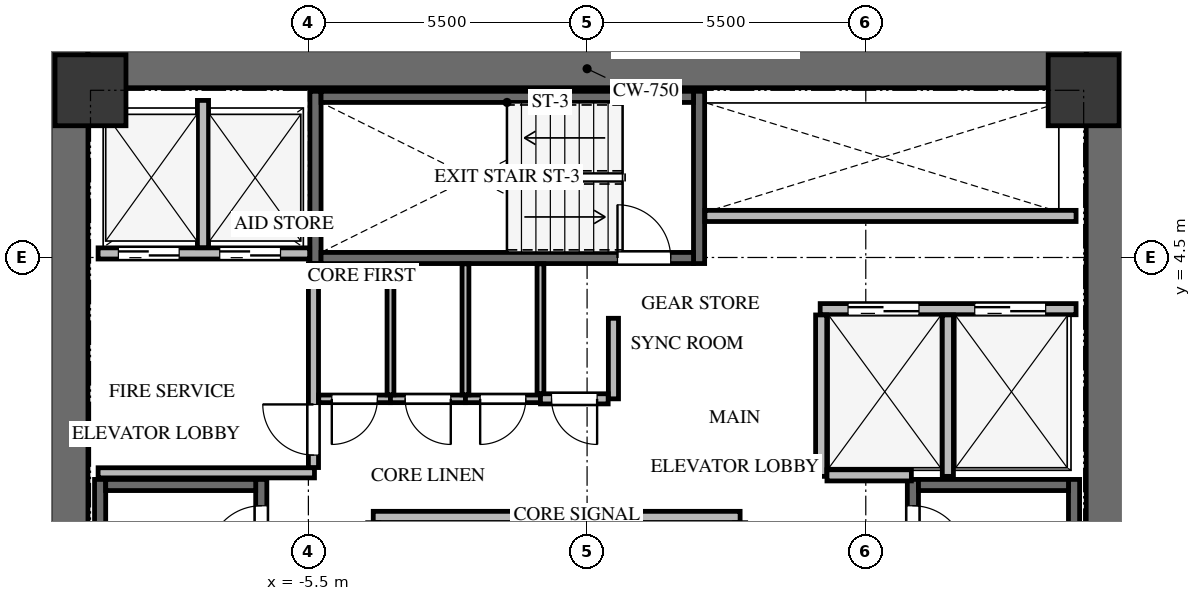
"""IFC4 building model, lengths in metres.
Left out: names, types, materials, properties, quantities, classifications, styles, units other than length and angle.
Written with IfcOpenShell. Run it as: python <this file> out.ifc"""

import sys

from ifc_helpers import new_model, si_unit, direction, frame, frame_2d, origin, origin_2d, place, context, subcontext, project, spatial, rectangle, extrude, source, transform, mapped, element, fill, save


model = new_model("IFC4")
c1 = context("Model", 3, precision=1e-05, world=origin(), true_north=direction((0.0, 1.0)))
c2 = subcontext(c1, "Body", "Model", "MODEL_VIEW")
j1 = project(units=[si_unit("LENGTHUNIT", "METRE"), si_unit("PLANEANGLEUNIT", "RADIAN")], contexts=[c1])
p1 = place(None, origin())
s1 = spatial("IfcSite", under=j1, at=p1, CompositionType="ELEMENT")
p2 = place(p1, origin())
s2 = spatial("IfcBuilding", under=s1, at=p2, CompositionType="ELEMENT")
p3 = place(p2, frame((0.0, 0.0, 137.1)))
s3 = spatial("IfcBuildingStorey", under=s2, at=p3, CompositionType="ELEMENT", Elevation=137.1)
for number, where, z_axis, x_axis in (
    (1, (-10.225, -8.6, 0.0), (0.0, 0.0, 1.0), (0.0, 1.0, 0.0)),
    (2, (10.225, -8.6, 0.0), (0.0, 0.0, 1.0), (0.0, 1.0, 0.0)),
):
    element("IfcWall", number, at=place(p3, frame(where, z_axis=z_axis, x_axis=x_axis)), inside=s3, PredefinedType="SHEAR", context=c2, shape_type="SweptSolid", body=[
        extrude(rectangle(XDim=17.2, YDim=0.75, at=frame_2d((8.6, 0.0))), origin(), (0.0, 0.0, 1.0), 3.0),
    ])
p4 = place(p3, frame((-9.85, 8.225, 0.0), z_axis=(0.0, 0.0, 1.0), x_axis=(1.0, 0.0, 0.0)))
e3 = element("IfcWall", 3, at=p4, inside=s3, PredefinedType="SHEAR", context=c2, shape_type="SweptSolid", body=[
    extrude(rectangle(XDim=19.7, YDim=0.75, at=frame_2d((9.85, 0.0))), origin(), (0.0, 0.0, 1.0), 3.0),
])
p5 = place(p3, frame((-6.43, -7.77, -0.24), z_axis=(0.0, 0.0, 1.0), x_axis=(0.0, 1.0, 0.0)))
e4 = element("IfcWall", 4, at=p5, inside=s3, PredefinedType="SHEAR", context=c2, shape_type="SweptSolid", body=[
    extrude(rectangle(XDim=7.89, YDim=0.22, at=frame_2d((3.945, 0.0))), origin(), (0.0, 0.0, 1.0), 3.0),
])
p6 = place(p5, frame((6.32, 0.0, 0.0)))
e5 = element("IfcOpeningElement", 5, at=p6, cuts=e4, PredefinedType="OPENING", context=c2, shape_type="SweptSolid", body=[
    extrude(rectangle(XDim=1.05, YDim=2.15, at=frame_2d((0.525, 1.075))), frame((0.0, 0.12, 0.0), z_axis=(0.0, -1.0, 0.0), x_axis=(1.0, 0.0, 0.0)), (0.0, 0.0, 1.0), 0.24),
])
p7 = place(p3, frame((-9.61, 0.12, -0.24), z_axis=(0.0, 0.0, 1.0), x_axis=(0.0, -1.0, 0.0)))
e6 = element("IfcWall", 6, at=p7, inside=s3, PredefinedType="SHEAR", context=c2, shape_type="SweptSolid", body=[
    extrude(rectangle(XDim=7.89, YDim=0.22, at=frame_2d((3.945, 0.0))), origin(), (0.0, 0.0, 1.0), 3.0),
])
p8 = place(p3, frame((-6.54, 0.01, -0.24), z_axis=(0.0, 0.0, 1.0), x_axis=(-1.0, 0.0, 0.0)))
e7 = element("IfcWall", 7, at=p8, inside=s3, PredefinedType="SHEAR", context=c2, shape_type="SweptSolid", body=[
    extrude(rectangle(XDim=2.96, YDim=0.22, at=frame_2d((1.48, 0.0))), origin(), (0.0, 0.0, 1.0), 3.0),
])
p9 = place(p3, frame((9.61, -7.77, -0.24), z_axis=(0.0, 0.0, 1.0), x_axis=(0.0, 1.0, 0.0)))
e8 = element("IfcWall", 8, at=p9, inside=s3, PredefinedType="SHEAR", context=c2, shape_type="SweptSolid", body=[
    extrude(rectangle(XDim=7.89, YDim=0.22, at=frame_2d((3.945, 0.0))), origin(), (0.0, 0.0, 1.0), 3.0),
])
p10 = place(p3, frame((6.43, 0.12, -0.24), z_axis=(0.0, 0.0, 1.0), x_axis=(0.0, -1.0, 0.0)))
e9 = element("IfcWall", 9, at=p10, inside=s3, PredefinedType="SHEAR", context=c2, shape_type="SweptSolid", body=[
    extrude(rectangle(XDim=7.89, YDim=0.22, at=frame_2d((3.945, 0.0))), origin(), (0.0, 0.0, 1.0), 3.0),
])
p11 = place(p10, frame((0.52, 0.0, 0.0)))
e10 = element("IfcOpeningElement", 10, at=p11, cuts=e9, PredefinedType="OPENING", context=c2, shape_type="SweptSolid", body=[
    extrude(rectangle(XDim=1.05, YDim=2.15, at=frame_2d((0.525, 1.075))), frame((0.0, 0.12, 0.0), z_axis=(0.0, -1.0, 0.0), x_axis=(1.0, 0.0, 0.0)), (0.0, 0.0, 1.0), 0.24),
])
p12 = place(p3, frame((9.5, 0.01, -0.24), z_axis=(0.0, 0.0, 1.0), x_axis=(-1.0, 0.0, 0.0)))
e11 = element("IfcWall", 11, at=p12, inside=s3, PredefinedType="SHEAR", context=c2, shape_type="SweptSolid", body=[
    extrude(rectangle(XDim=2.96, YDim=0.22, at=frame_2d((1.48, 0.0))), origin(), (0.0, 0.0, 1.0), 3.0),
])
for number, where, z_axis, x_axis in (
    (12, (2.21, 4.38, -0.24), (0.0, 0.0, 1.0), (0.0, 1.0, 0.0)),
    (13, (-5.36, 7.78, -0.24), (0.0, 0.0, 1.0), (0.0, -1.0, 0.0)),
):
    element("IfcWall", number, at=place(p3, frame(where, z_axis=z_axis, x_axis=x_axis)), inside=s3, PredefinedType="SHEAR", context=c2, shape_type="SweptSolid", body=[
        extrude(rectangle(XDim=3.4, YDim=0.22, at=frame_2d((1.7, 0.0))), origin(), (0.0, 0.0, 1.0), 3.0),
    ])
p13 = place(p3, frame((-5.25, 4.49, -0.24), z_axis=(0.0, 0.0, 1.0), x_axis=(1.0, 0.0, 0.0)))
e14 = element("IfcWall", 14, at=p13, inside=s3, PredefinedType="SHEAR", context=c2, shape_type="SweptSolid", body=[
    extrude(rectangle(XDim=7.35, YDim=0.22, at=frame_2d((3.675, 0.0))), origin(), (0.0, 0.0, 1.0), 3.0),
])
p14 = place(p13, frame((5.85, 0.0, 0.0)))
e15 = element("IfcOpeningElement", 15, at=p14, cuts=e14, PredefinedType="OPENING", context=c2, shape_type="SweptSolid", body=[
    extrude(rectangle(XDim=1.05, YDim=2.15, at=frame_2d((0.525, 1.075))), frame((0.0, 0.12, 0.0), z_axis=(0.0, -1.0, 0.0), x_axis=(1.0, 0.0, 0.0)), (0.0, 0.0, 1.0), 0.24),
])
p15 = place(p3, frame((2.1, 7.67, -0.24), z_axis=(0.0, 0.0, 1.0), x_axis=(-1.0, 0.0, 0.0)))
e16 = element("IfcWall", 16, at=p15, inside=s3, PredefinedType="SHEAR", context=c2, shape_type="SweptSolid", body=[
    extrude(rectangle(XDim=7.35, YDim=0.22, at=frame_2d((3.675, 0.0))), origin(), (0.0, 0.0, 1.0), 3.0),
])
m1 = source(origin(), c2, "Body", "SweptSolid", [
    extrude(rectangle(XDim=1.4, YDim=1.4, at=origin_2d()), origin(), (0.0, 0.0, 1.0), 3.0),
])
for number, where, z_axis, x_axis in (
    (17, (9.8, 7.8, -0.24), (0.0, 0.0, 1.0), (1.0, 0.0, 0.0)),
    (18, (-9.8, 7.8, -0.24), (0.0, 0.0, 1.0), (1.0, 0.0, 0.0)),
):
    element("IfcColumn", number, at=place(p3, frame(where, z_axis=z_axis, x_axis=x_axis)), inside=s3, PredefinedType="COLUMN", context=c2, shape_type="MappedRepresentation", body=[
        mapped(m1, transform((0.0, 0.0, 0.0), x_axis=(1.0, 0.0, 0.0), y_axis=(0.0, 1.0, 0.0), z_axis=(0.0, 0.0, 1.0), scale=1.0)),
    ])
p16 = place(p3, frame((-9.65, 4.58, 0.0), z_axis=(0.0, 0.0, 1.0), x_axis=(1.0, 0.0, 0.0)))
e19 = element("IfcWall", 19, at=p16, inside=s3, PredefinedType="SOLIDWALL", context=c2, shape_type="SweptSolid", body=[
    extrude(rectangle(XDim=4.175, YDim=0.22, at=frame_2d((2.087, 0.0))), origin(), (0.0, 0.0, 1.0), 2.745),
])
p17 = place(p16, frame((0.4, 0.0, 0.0)))
e20 = element("IfcOpeningElement", 20, at=p17, cuts=e19, PredefinedType="OPENING", context=c2, shape_type="SweptSolid", body=[
    extrude(rectangle(XDim=1.2, YDim=2.15, at=frame_2d((0.6, 1.075))), frame((0.0, 0.12, 0.0), z_axis=(0.0, -1.0, 0.0), x_axis=(1.0, 0.0, 0.0)), (0.0, 0.0, 1.0), 0.24),
])
p18 = place(p16, frame((2.4, 0.0, 0.0)))
e21 = element("IfcOpeningElement", 21, at=p18, cuts=e19, PredefinedType="OPENING", context=c2, shape_type="SweptSolid", body=[
    extrude(rectangle(XDim=1.2, YDim=2.15, at=frame_2d((0.6, 1.075))), frame((0.0, 0.12, 0.0), z_axis=(0.0, -1.0, 0.0), x_axis=(1.0, 0.0, 0.0)), (0.0, 0.0, 1.0), 0.24),
])
p19 = place(p3, frame((-7.58, 4.694, 0.0), z_axis=(0.0, 0.0, 1.0), x_axis=(0.0, 1.0, 0.0)))
e22 = element("IfcWall", 22, at=p19, inside=s3, PredefinedType="SOLIDWALL", context=c2, shape_type="SweptSolid", body=[
    extrude(rectangle(XDim=2.906, YDim=0.22, at=frame_2d((1.453, 0.0))), origin(), (0.0, 0.0, 1.0), 2.745),
])
p20 = place(p3, frame((-9.65, 0.25, 0.0), z_axis=(0.0, 0.0, 1.0), x_axis=(1.0, 0.0, 0.0)))
e23 = element("IfcWall", 23, at=p20, inside=s3, PredefinedType="SOLIDWALL", context=c2, shape_type="SweptSolid", body=[
    extrude(rectangle(XDim=4.27, YDim=0.2, at=frame_2d((2.135, 0.0))), origin(), (0.0, 0.0, 1.0), 2.745),
])
p21 = place(p3, frame((-5.4, 0.354, 0.0), z_axis=(0.0, 0.0, 1.0), x_axis=(0.0, 1.0, 0.0)))
e24 = element("IfcWall", 24, at=p21, inside=s3, PredefinedType="SOLIDWALL", context=c2, shape_type="SweptSolid", body=[
    extrude(rectangle(XDim=4.026, YDim=0.2, at=frame_2d((2.013, 0.0))), origin(), (0.0, 0.0, 1.0), 2.745),
])
p22 = place(p21, frame((0.246, 0.0, 0.0)))
e25 = element("IfcOpeningElement", 25, at=p22, cuts=e24, PredefinedType="OPENING", context=c2, shape_type="SweptSolid", body=[
    extrude(rectangle(XDim=1.0, YDim=2.15, at=frame_2d((0.5, 1.075))), frame((0.0, 0.11, 0.0), z_axis=(0.0, -1.0, 0.0), x_axis=(1.0, 0.0, 0.0)), (0.0, 0.0, 1.0), 0.22),
])
p23 = place(p3, frame((4.6, 3.48, 0.0), z_axis=(0.0, 0.0, 1.0), x_axis=(1.0, 0.0, 0.0)))
e26 = element("IfcWall", 26, at=p23, inside=s3, PredefinedType="SOLIDWALL", context=c2, shape_type="SweptSolid", body=[
    extrude(rectangle(XDim=5.05, YDim=0.22, at=frame_2d((2.525, 0.0))), origin(), (0.0, 0.0, 1.0), 2.745),
])
p24 = place(p23, frame((0.55, 0.0, 0.0)))
e27 = element("IfcOpeningElement", 27, at=p24, cuts=e26, PredefinedType="OPENING", context=c2, shape_type="SweptSolid", body=[
    extrude(rectangle(XDim=1.4, YDim=2.15, at=frame_2d((0.7, 1.075))), frame((0.0, 0.12, 0.0), z_axis=(0.0, -1.0, 0.0), x_axis=(1.0, 0.0, 0.0)), (0.0, 0.0, 1.0), 0.24),
])
p25 = place(p23, frame((3.05, 0.0, 0.0)))
e28 = element("IfcOpeningElement", 28, at=p25, cuts=e26, PredefinedType="OPENING", context=c2, shape_type="SweptSolid", body=[
    extrude(rectangle(XDim=1.4, YDim=2.15, at=frame_2d((0.7, 1.075))), frame((0.0, 0.12, 0.0), z_axis=(0.0, -1.0, 0.0), x_axis=(1.0, 0.0, 0.0)), (0.0, 0.0, 1.0), 0.24),
])
for number, where, z_axis, x_axis in (
    (29, (4.62, 0.18, 0.0), (0.0, 0.0, 1.0), (0.0, 1.0, 0.0)),
    (30, (7.12, 0.18, 0.0), (0.0, 0.0, 1.0), (0.0, 1.0, 0.0)),
):
    element("IfcWall", number, at=place(p3, frame(where, z_axis=z_axis, x_axis=x_axis)), inside=s3, PredefinedType="SOLIDWALL", context=c2, shape_type="SweptSolid", body=[
        extrude(rectangle(XDim=3.186, YDim=0.22, at=frame_2d((1.593, 0.0))), origin(), (0.0, 0.0, 1.0), 2.745),
    ])
p26 = place(p3, frame((4.734, 0.2, 0.0), z_axis=(0.0, 0.0, 1.0), x_axis=(1.0, 0.0, 0.0)))
e31 = element("IfcWall", 31, at=p26, inside=s3, PredefinedType="SOLIDWALL", context=c2, shape_type="SweptSolid", body=[
    extrude(rectangle(XDim=1.666, YDim=0.22, at=frame_2d((0.833, 0.0))), origin(), (0.0, 0.0, 1.0), 2.745),
])
p27 = place(p3, frame((-4.22, -0.62, 0.0), z_axis=(0.0, 0.0, 1.0), x_axis=(1.0, 0.0, 0.0)))
e32 = element("IfcWall", 32, at=p27, inside=s3, PredefinedType="SOLIDWALL", context=c2, shape_type="SweptSolid", body=[
    extrude(rectangle(XDim=7.24, YDim=0.22, at=frame_2d((3.62, 0.0))), origin(), (0.0, 0.0, 1.0), 2.745),
])
p28 = place(p3, frame((2.325, 5.32, 0.0), z_axis=(0.0, 0.0, 1.0), x_axis=(1.0, 0.0, 0.0)))
e33 = element("IfcWall", 33, at=p28, inside=s3, PredefinedType="SOLIDWALL", context=c2, shape_type="SweptSolid", body=[
    extrude(rectangle(XDim=7.325, YDim=0.22, at=frame_2d((3.663, 0.0))), origin(), (0.0, 0.0, 1.0), 2.745),
])
p29 = place(p3, frame((-3.88, 1.71, 0.0), z_axis=(0.0, 0.0, 1.0), x_axis=(-1.0, 0.0, 0.0)))
e34 = element("IfcWall", 34, at=p29, inside=s3, PredefinedType="PARTITIONING", context=c2, shape_type="SweptSolid", body=[
    extrude(rectangle(XDim=1.416, YDim=0.15, at=frame_2d((0.708, 0.0))), origin(), (0.0, 0.0, 1.0), 2.745),
])
p30 = place(p29, frame((0.258, 0.0, 0.0)))
e35 = element("IfcOpeningElement", 35, at=p30, cuts=e34, PredefinedType="OPENING", context=c2, shape_type="SweptSolid", body=[
    extrude(rectangle(XDim=0.9, YDim=2.05, at=frame_2d((0.45, 1.025))), frame((0.0, 0.085, 0.0), z_axis=(0.0, -1.0, 0.0), x_axis=(1.0, 0.0, 0.0)), (0.0, 0.0, 1.0), 0.17),
])
p31 = place(p3, frame((-2.4, 1.71, 0.0), z_axis=(0.0, 0.0, 1.0), x_axis=(-1.0, 0.0, 0.0)))
e36 = element("IfcWall", 36, at=p31, inside=s3, PredefinedType="PARTITIONING", context=c2, shape_type="SweptSolid", body=[
    extrude(rectangle(XDim=1.48, YDim=0.15, at=frame_2d((0.74, 0.0))), origin(), (0.0, 0.0, 1.0), 2.745),
])
p32 = place(p31, frame((0.29, 0.0, 0.0)))
e37 = element("IfcOpeningElement", 37, at=p32, cuts=e36, PredefinedType="OPENING", context=c2, shape_type="SweptSolid", body=[
    extrude(rectangle(XDim=0.9, YDim=2.05, at=frame_2d((0.45, 1.025))), frame((0.0, 0.085, 0.0), z_axis=(0.0, -1.0, 0.0), x_axis=(1.0, 0.0, 0.0)), (0.0, 0.0, 1.0), 0.17),
])
p33 = place(p3, frame((-0.92, 1.71, 0.0), z_axis=(0.0, 0.0, 1.0), x_axis=(-1.0, 0.0, 0.0)))
e38 = element("IfcWall", 38, at=p33, inside=s3, PredefinedType="PARTITIONING", context=c2, shape_type="SweptSolid", body=[
    extrude(rectangle(XDim=1.48, YDim=0.15, at=frame_2d((0.74, 0.0))), origin(), (0.0, 0.0, 1.0), 2.745),
])
p34 = place(p33, frame((0.29, 0.0, 0.0)))
e39 = element("IfcOpeningElement", 39, at=p34, cuts=e38, PredefinedType="OPENING", context=c2, shape_type="SweptSolid", body=[
    extrude(rectangle(XDim=0.9, YDim=2.05, at=frame_2d((0.45, 1.025))), frame((0.0, 0.085, 0.0), z_axis=(0.0, -1.0, 0.0), x_axis=(1.0, 0.0, 0.0)), (0.0, 0.0, 1.0), 0.17),
])
p35 = place(p3, frame((0.52, 3.3, 0.0), z_axis=(0.0, 0.0, 1.0), x_axis=(0.0, -1.0, 0.0)))
e40 = element("IfcWall", 40, at=p35, inside=s3, PredefinedType="SOLIDWALL", context=c2, shape_type="SweptSolid", body=[
    extrude(rectangle(XDim=1.59, YDim=0.2, at=frame_2d((0.795, 0.0))), origin(), (0.0, 0.0, 1.0), 2.745),
])
p36 = place(p3, frame((0.416, 1.71, 0.0), z_axis=(0.0, 0.0, 1.0), x_axis=(-1.0, 0.0, 0.0)))
e41 = element("IfcWall", 41, at=p36, inside=s3, PredefinedType="SOLIDWALL", context=c2, shape_type="SweptSolid", body=[
    extrude(rectangle(XDim=1.336, YDim=0.2, at=frame_2d((0.668, 0.0))), origin(), (0.0, 0.0, 1.0), 2.745),
])
p37 = place(p36, frame((0.218, 0.0, 0.0)))
e42 = element("IfcOpeningElement", 42, at=p37, cuts=e41, PredefinedType="OPENING", context=c2, shape_type="SweptSolid", body=[
    extrude(rectangle(XDim=0.9, YDim=2.05, at=frame_2d((0.45, 1.025))), frame((0.0, 0.11, 0.0), z_axis=(0.0, -1.0, 0.0), x_axis=(1.0, 0.0, 0.0)), (0.0, 0.0, 1.0), 0.22),
])
for number, where, z_axis, x_axis in (
    (43, (-3.88, 4.375, 0.0), (0.0, 0.0, 1.0), (0.0, -1.0, 0.0)),
    (44, (-2.4, 4.375, 0.0), (0.0, 0.0, 1.0), (0.0, -1.0, 0.0)),
):
    element("IfcWall", number, at=place(p3, frame(where, z_axis=z_axis, x_axis=x_axis)), inside=s3, PredefinedType="PARTITIONING", context=c2, shape_type="SweptSolid", body=[
        extrude(rectangle(XDim=2.586, YDim=0.135, at=frame_2d((1.293, 0.0))), origin(), (0.0, 0.0, 1.0), 2.745),
    ])
p38 = place(p3, frame((-0.92, 4.375, 0.0), z_axis=(0.0, 0.0, 1.0), x_axis=(0.0, -1.0, 0.0)))
e45 = element("IfcWall", 45, at=p38, inside=s3, PredefinedType="PARTITIONING", context=c2, shape_type="SweptSolid", body=[
    extrude(rectangle(XDim=2.561, YDim=0.135, at=frame_2d((1.281, 0.0))), origin(), (0.0, 0.0, 1.0), 2.745),
])
m2 = source(origin(), c2, "Body", "SweptSolid", [
    extrude(rectangle(XDim=1.05, YDim=2.15, at=frame_2d((0.525, 1.075))), frame((0.0, 0.025, 0.0), z_axis=(0.0, -1.0, 0.0), x_axis=(1.0, 0.0, 0.0)), (0.0, 0.0, 1.0), 0.05),
])
p39 = place(p6, origin())
e46 = element("IfcDoor", 46, at=p39, inside=s3, OperationType="SINGLE_SWING_LEFT", PredefinedType="DOOR", context=c2, shape_type="MappedRepresentation", body=[
    mapped(m2, transform((0.0, 0.0, 0.0), x_axis=(1.0, 0.0, 0.0), y_axis=(0.0, 1.0, 0.0), z_axis=(0.0, 0.0, 1.0), scale=1.0)),
])
fill(e5, e46)
m3 = source(origin(), c2, "Body", "SweptSolid", [
    extrude(rectangle(XDim=1.05, YDim=2.15, at=frame_2d((0.525, 1.075))), frame((0.0, 0.025, 0.0), z_axis=(0.0, -1.0, 0.0), x_axis=(1.0, 0.0, 0.0)), (0.0, 0.0, 1.0), 0.05),
])
p40 = place(p11, origin())
e47 = element("IfcDoor", 47, at=p40, inside=s3, OperationType="SINGLE_SWING_RIGHT", PredefinedType="DOOR", context=c2, shape_type="MappedRepresentation", body=[
    mapped(m3, transform((0.0, 0.0, 0.0), x_axis=(1.0, 0.0, 0.0), y_axis=(0.0, 1.0, 0.0), z_axis=(0.0, 0.0, 1.0), scale=1.0)),
])
fill(e10, e47)
p41 = place(p14, origin())
e48 = element("IfcDoor", 48, at=p41, inside=s3, OperationType="SINGLE_SWING_LEFT", PredefinedType="DOOR", context=c2, shape_type="MappedRepresentation", body=[
    mapped(m2, transform((0.0, 0.0, 0.0), x_axis=(1.0, 0.0, 0.0), y_axis=(0.0, 1.0, 0.0), z_axis=(0.0, 0.0, 1.0), scale=1.0)),
])
fill(e15, e48)
m4 = source(origin(), c2, "Body", "SweptSolid", [
    extrude(rectangle(XDim=1.2, YDim=2.15, at=frame_2d((0.6, 1.075))), frame((0.0, 0.025, 0.0), z_axis=(0.0, -1.0, 0.0), x_axis=(1.0, 0.0, 0.0)), (0.0, 0.0, 1.0), 0.05),
])
p42 = place(p17, origin())
e49 = element("IfcDoor", 49, at=p42, inside=s3, OperationType="DOUBLE_DOOR_SLIDING", PredefinedType="DOOR", context=c2, shape_type="MappedRepresentation", body=[
    mapped(m4, transform((0.0, 0.0, 0.0), x_axis=(1.0, 0.0, 0.0), y_axis=(0.0, 1.0, 0.0), z_axis=(0.0, 0.0, 1.0), scale=1.0)),
])
fill(e20, e49)
p43 = place(p18, origin())
e50 = element("IfcDoor", 50, at=p43, inside=s3, OperationType="DOUBLE_DOOR_SLIDING", PredefinedType="DOOR", context=c2, shape_type="MappedRepresentation", body=[
    mapped(m4, transform((0.0, 0.0, 0.0), x_axis=(1.0, 0.0, 0.0), y_axis=(0.0, 1.0, 0.0), z_axis=(0.0, 0.0, 1.0), scale=1.0)),
])
fill(e21, e50)
m5 = source(origin(), c2, "Body", "SweptSolid", [
    extrude(rectangle(XDim=1.0, YDim=2.15, at=frame_2d((0.5, 1.075))), frame((0.0, 0.025, 0.0), z_axis=(0.0, -1.0, 0.0), x_axis=(1.0, 0.0, 0.0)), (0.0, 0.0, 1.0), 0.05),
])
p44 = place(p22, origin())
e51 = element("IfcDoor", 51, at=p44, inside=s3, OperationType="SINGLE_SWING_RIGHT", PredefinedType="DOOR", context=c2, shape_type="MappedRepresentation", body=[
    mapped(m5, transform((0.0, 0.0, 0.0), x_axis=(1.0, 0.0, 0.0), y_axis=(0.0, 1.0, 0.0), z_axis=(0.0, 0.0, 1.0), scale=1.0)),
])
fill(e25, e51)
m6 = source(origin(), c2, "Body", "SweptSolid", [
    extrude(rectangle(XDim=1.4, YDim=2.15, at=frame_2d((0.7, 1.075))), frame((0.0, 0.025, 0.0), z_axis=(0.0, -1.0, 0.0), x_axis=(1.0, 0.0, 0.0)), (0.0, 0.0, 1.0), 0.05),
])
p45 = place(p24, origin())
e52 = element("IfcDoor", 52, at=p45, inside=s3, OperationType="DOUBLE_DOOR_SLIDING", PredefinedType="DOOR", context=c2, shape_type="MappedRepresentation", body=[
    mapped(m6, transform((0.0, 0.0, 0.0), x_axis=(1.0, 0.0, 0.0), y_axis=(0.0, 1.0, 0.0), z_axis=(0.0, 0.0, 1.0), scale=1.0)),
])
fill(e27, e52)
p46 = place(p25, origin())
e53 = element("IfcDoor", 53, at=p46, inside=s3, OperationType="DOUBLE_DOOR_SLIDING", PredefinedType="DOOR", context=c2, shape_type="MappedRepresentation", body=[
    mapped(m6, transform((0.0, 0.0, 0.0), x_axis=(1.0, 0.0, 0.0), y_axis=(0.0, 1.0, 0.0), z_axis=(0.0, 0.0, 1.0), scale=1.0)),
])
fill(e28, e53)
m7 = source(origin(), c2, "Body", "SweptSolid", [
    extrude(rectangle(XDim=0.9, YDim=2.05, at=frame_2d((0.45, 1.025))), frame((0.0, 0.025, 0.0), z_axis=(0.0, -1.0, 0.0), x_axis=(1.0, 0.0, 0.0)), (0.0, 0.0, 1.0), 0.05),
])
p47 = place(p30, origin())
e54 = element("IfcDoor", 54, at=p47, inside=s3, OperationType="SINGLE_SWING_RIGHT", PredefinedType="DOOR", context=c2, shape_type="MappedRepresentation", body=[
    mapped(m7, transform((0.0, 0.0, 0.0), x_axis=(1.0, 0.0, 0.0), y_axis=(0.0, 1.0, 0.0), z_axis=(0.0, 0.0, 1.0), scale=1.0)),
])
fill(e35, e54)
m8 = source(origin(), c2, "Body", "SweptSolid", [
    extrude(rectangle(XDim=0.9, YDim=2.05, at=frame_2d((0.45, 1.025))), frame((0.0, 0.025, 0.0), z_axis=(0.0, -1.0, 0.0), x_axis=(1.0, 0.0, 0.0)), (0.0, 0.0, 1.0), 0.05),
])
p48 = place(p32, origin())
e55 = element("IfcDoor", 55, at=p48, inside=s3, OperationType="SINGLE_SWING_LEFT", PredefinedType="DOOR", context=c2, shape_type="MappedRepresentation", body=[
    mapped(m8, transform((0.0, 0.0, 0.0), x_axis=(1.0, 0.0, 0.0), y_axis=(0.0, 1.0, 0.0), z_axis=(0.0, 0.0, 1.0), scale=1.0)),
])
fill(e37, e55)
p49 = place(p34, origin())
e56 = element("IfcDoor", 56, at=p49, inside=s3, OperationType="SINGLE_SWING_RIGHT", PredefinedType="DOOR", context=c2, shape_type="MappedRepresentation", body=[
    mapped(m7, transform((0.0, 0.0, 0.0), x_axis=(1.0, 0.0, 0.0), y_axis=(0.0, 1.0, 0.0), z_axis=(0.0, 0.0, 1.0), scale=1.0)),
])
fill(e39, e56)
p50 = place(p37, origin())
e57 = element("IfcDoor", 57, at=p50, inside=s3, OperationType="SINGLE_SWING_LEFT", PredefinedType="DOOR", context=c2, shape_type="MappedRepresentation", body=[
    mapped(m8, transform((0.0, 0.0, 0.0), x_axis=(1.0, 0.0, 0.0), y_axis=(0.0, 1.0, 0.0), z_axis=(0.0, 0.0, 1.0), scale=1.0)),
])
fill(e42, e57)
save(model, sys.argv[1])
